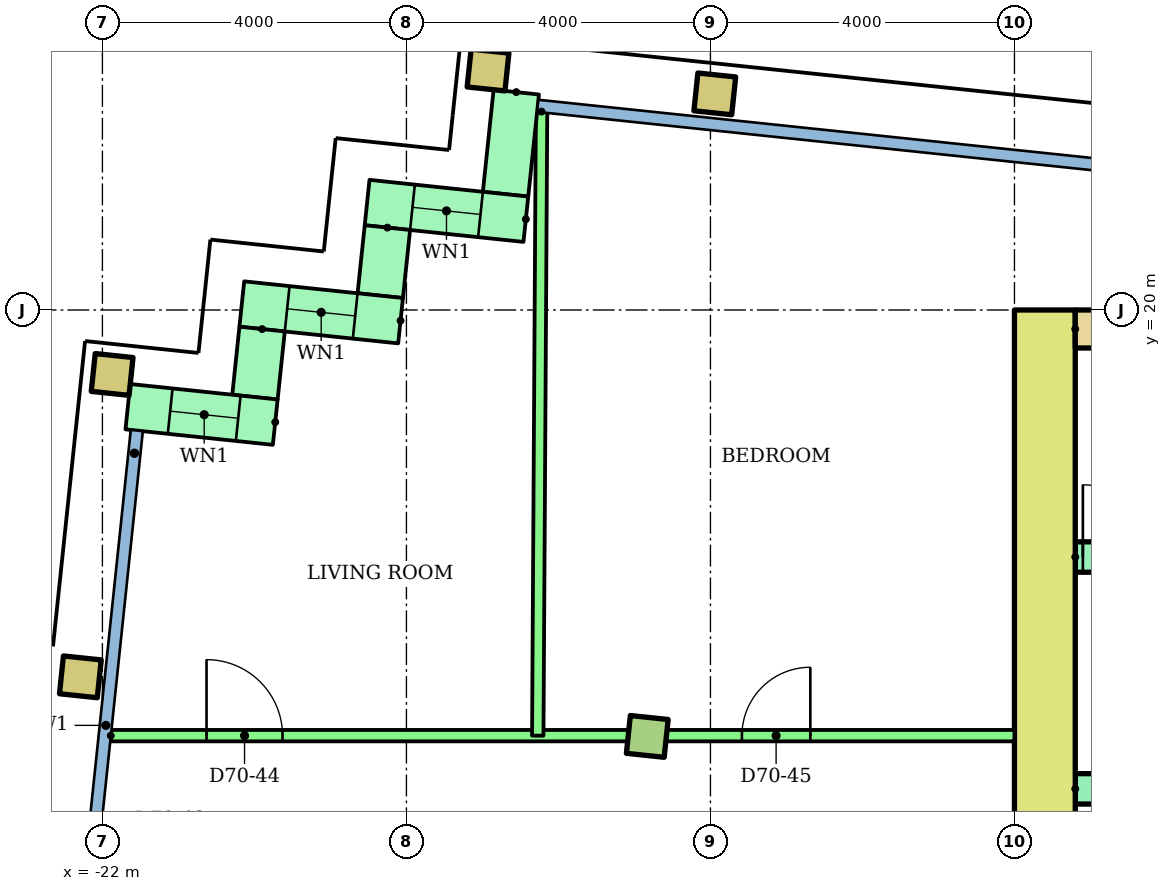
"""IFC4 building model, lengths in metres.
Left out: names, types, materials, properties, quantities, classifications, styles, units other than length and angle.
Written with IfcOpenShell. Run it as: python <this file> out.ifc"""

import sys

from ifc_helpers import new_model, si_unit, direction, frame, frame_2d, origin, origin_2d, place, context, subcontext, project, spatial, rectangle, hollow_rectangle, extrude, element, fill, save


model = new_model("IFC4")
c1 = context("Model", 3, precision=1e-05, world=origin(), true_north=direction((0.0, 1.0)))
c2 = subcontext(c1, "Body", "Model", "MODEL_VIEW")
j1 = project(units=[si_unit("LENGTHUNIT", "METRE"), si_unit("PLANEANGLEUNIT", "RADIAN")], contexts=[c1])
p1 = place(None, origin())
s1 = spatial("IfcSite", under=j1, at=p1, CompositionType="ELEMENT")
p2 = place(p1, origin())
s2 = spatial("IfcBuilding", under=s1, at=p2, CompositionType="ELEMENT")
p3 = place(p2, frame((0.0, 0.0, 269.1)))
s3 = spatial("IfcBuildingStorey", under=s2, at=p3, CompositionType="ELEMENT", Elevation=269.1)
p4 = place(p3, frame((-22.29, 15.174, 0.0), z_axis=(0.0, 0.0, 1.0), x_axis=(0.994521895368, -0.104528463268, 0.0)))
e1 = element("IfcColumn", 1, at=p4, inside=s3, PredefinedType="COLUMN", context=c2, shape_type="SweptSolid", body=[
    extrude(hollow_rectangle(XDim=0.5, YDim=0.5, WallThickness=0.025, at=origin_2d()), origin(), (0.0, 0.0, 1.0), 3.2),
])
p5 = place(p3, frame((-14.831, 14.39, 0.0), z_axis=(0.0, 0.0, 1.0), x_axis=(0.994521895368, -0.104528463268, 0.0)))
e2 = element("IfcColumn", 2, at=p5, inside=s3, PredefinedType="COLUMN", context=c2, shape_type="SweptSolid", body=[
    extrude(rectangle(XDim=0.5, YDim=0.5, at=origin_2d()), origin(), (0.0, 0.0, 1.0), 3.2),
])
for number, where, z_axis, x_axis in (
    (3, (-21.872, 19.152, 0.0), (0.0, 0.0, 1.0), (0.995, -0.105, 0.0)),
    (4, (-16.926, 23.157, 0.0), (0.0, 0.0, 1.0), (0.995, -0.105, 0.0)),
    (5, (-13.943, 22.843, 0.0), (0.0, 0.0, 1.0), (0.995, -0.105, 0.0)),
):
    element("IfcColumn", number, at=place(p3, frame(where, z_axis=z_axis, x_axis=x_axis)), inside=s3, PredefinedType="COLUMN", context=c2, shape_type="SweptSolid", body=[
        extrude(hollow_rectangle(XDim=0.5, YDim=0.5, WallThickness=0.025, at=origin_2d()), origin(), (0.0, 0.0, 1.0), 3.2),
    ])
p6 = place(p3, frame((-16.555, 22.866, 0.0), z_axis=(0.0, 0.0, 1.0), x_axis=(-0.104515354875, -0.994523273029, 0.0)))
e6 = element("IfcWall", 6, at=p6, inside=s3, PredefinedType="STANDARD", context=c2, shape_type="SweptSolid", body=[
    extrude(rectangle(XDim=1.35, YDim=0.6, at=frame_2d((0.675, 0.0))), origin(), (0.0, 0.0, 1.0), 2.92),
])
p7 = place(p3, frame((-16.429, 21.194, 0.0), z_axis=(0.0, 0.0, 1.0), x_axis=(-0.994522640205, 0.104521376379, 0.0)))
e7 = element("IfcWall", 7, at=p7, inside=s3, PredefinedType="STANDARD", context=c2, shape_type="SweptSolid", body=[
    extrude(rectangle(XDim=2.1, YDim=0.6, at=frame_2d((1.05, 0.0))), origin(), (0.0, 0.0, 1.0), 2.92),
])
p8 = place(p7, frame((0.6, 0.0, 0.9)))
e8 = element("IfcOpeningElement", 8, at=p8, cuts=e7, PredefinedType="OPENING", context=c2, shape_type="SweptSolid", body=[
    extrude(rectangle(XDim=0.9, YDim=1.5, at=frame_2d((0.45, 0.75))), frame((0.0, 0.31, 0.0), z_axis=(0.0, -1.0, 0.0), x_axis=(1.0, 0.0, 0.0)), (0.0, 0.0, 1.0), 0.62),
])
p9 = place(p3, frame((-18.25, 21.084, 0.0), z_axis=(0.0, 0.0, 1.0), x_axis=(-0.104416541099, -0.994533652495, 0.0)))
e9 = element("IfcWall", 9, at=p9, inside=s3, PredefinedType="STANDARD", context=c2, shape_type="SweptSolid", body=[
    extrude(rectangle(XDim=0.9, YDim=0.6, at=frame_2d((0.45, 0.0))), origin(), (0.0, 0.0, 1.0), 2.92),
])
p10 = place(p3, frame((-18.077, 19.859, 0.0), z_axis=(0.0, 0.0, 1.0), x_axis=(-0.994522640205, 0.104521376379, 0.0)))
e10 = element("IfcWall", 10, at=p10, inside=s3, PredefinedType="STANDARD", context=c2, shape_type="SweptSolid", body=[
    extrude(rectangle(XDim=2.1, YDim=0.6, at=frame_2d((1.05, 0.0))), origin(), (0.0, 0.0, 1.0), 2.92),
])
p11 = place(p10, frame((0.6, 0.0, 0.9)))
e11 = element("IfcOpeningElement", 11, at=p11, cuts=e10, PredefinedType="OPENING", context=c2, shape_type="SweptSolid", body=[
    extrude(rectangle(XDim=0.9, YDim=1.5, at=frame_2d((0.45, 0.75))), frame((0.0, 0.31, 0.0), z_axis=(0.0, -1.0, 0.0), x_axis=(1.0, 0.0, 0.0)), (0.0, 0.0, 1.0), 0.62),
])
p12 = place(p3, frame((-19.899, 19.749, 0.0), z_axis=(0.0, 0.0, 1.0), x_axis=(-0.104741284723, -0.994499503909, 0.0)))
e12 = element("IfcWall", 12, at=p12, inside=s3, PredefinedType="STANDARD", context=c2, shape_type="SweptSolid", body=[
    extrude(rectangle(XDim=0.9, YDim=0.6, at=frame_2d((0.45, 0.0))), origin(), (0.0, 0.0, 1.0), 2.92),
])
p13 = place(p3, frame((-19.726, 18.524, 0.0), z_axis=(0.0, 0.0, 1.0), x_axis=(-0.994534226826, 0.104411070641, 0.0)))
e13 = element("IfcWall", 13, at=p13, inside=s3, PredefinedType="STANDARD", context=c2, shape_type="SweptSolid", body=[
    extrude(rectangle(XDim=1.95, YDim=0.6, at=frame_2d((0.975, 0.0))), origin(), (0.0, 0.0, 1.0), 2.92),
])
p14 = place(p13, frame((0.49, 0.0, 0.9)))
e14 = element("IfcOpeningElement", 14, at=p14, cuts=e13, PredefinedType="OPENING", context=c2, shape_type="SweptSolid", body=[
    extrude(rectangle(XDim=0.9, YDim=1.5, at=frame_2d((0.45, 0.75))), frame((0.0, 0.31, 0.0), z_axis=(0.0, -1.0, 0.0), x_axis=(1.0, 0.0, 0.0)), (0.0, 0.0, 1.0), 0.62),
])
p15 = place(p3, frame((-9.6, 6.4, 0.0), z_axis=(0.0, 0.0, 1.0), x_axis=(0.0, 1.0, 0.0)))
e15 = element("IfcWall", 15, at=p15, inside=s3, PredefinedType="SHEAR", context=c2, shape_type="SweptSolid", body=[
    extrude(rectangle(XDim=13.6, YDim=0.8, at=frame_2d((6.8, 0.0))), origin(), (0.0, 0.0, 1.0), 2.92),
])
p16 = place(p3, frame((-9.2, 19.75, 0.0)))
e16 = element("IfcWall", 16, at=p16, inside=s3, PredefinedType="SHEAR", context=c2, shape_type="SweptSolid", body=[
    extrude(rectangle(XDim=18.4, YDim=0.5, at=frame_2d((9.2, 0.0))), origin(), (0.0, 0.0, 1.0), 2.92),
])
p17 = place(p3, frame((-9.2, 13.7, 0.0)))
e17 = element("IfcWall", 17, at=p17, inside=s3, PredefinedType="SHEAR", context=c2, shape_type="SweptSolid", body=[
    extrude(rectangle(XDim=8.0, YDim=0.4, at=frame_2d((4.0, 0.0))), origin(), (0.0, 0.0, 1.0), 2.92),
])
p18 = place(p3, frame((-9.2, 16.75, 0.0)))
e18 = element("IfcWall", 18, at=p18, inside=s3, PredefinedType="SHEAR", context=c2, shape_type="SweptSolid", body=[
    extrude(rectangle(XDim=18.4, YDim=0.4, at=frame_2d((9.2, 0.0))), origin(), (0.0, 0.0, 1.0), 2.92),
])
p19 = place(p18, frame((0.1, 0.0, 0.0)))
e19 = element("IfcOpeningElement", 19, at=p19, cuts=e18, PredefinedType="OPENING", context=c2, shape_type="SweptSolid", body=[
    extrude(rectangle(XDim=0.95, YDim=2.1, at=frame_2d((0.475, 1.05))), frame((0.0, 0.21, 0.0), z_axis=(0.0, -1.0, 0.0), x_axis=(1.0, 0.0, 0.0)), (0.0, 0.0, 1.0), 0.42),
])
p20 = place(p18, frame((6.1, 0.0, 0.0)))
e20 = element("IfcOpeningElement", 20, at=p20, cuts=e18, PredefinedType="OPENING", context=c2, shape_type="SweptSolid", body=[
    extrude(rectangle(XDim=0.95, YDim=2.1, at=frame_2d((0.475, 1.05))), frame((0.0, 0.21, 0.0), z_axis=(0.0, -1.0, 0.0), x_axis=(1.0, 0.0, 0.0)), (0.0, 0.0, 1.0), 0.42),
])
p21 = place(p18, frame((12.1, 0.0, 0.0)))
e21 = element("IfcOpeningElement", 21, at=p21, cuts=e18, PredefinedType="OPENING", context=c2, shape_type="SweptSolid", body=[
    extrude(rectangle(XDim=0.95, YDim=2.1, at=frame_2d((0.475, 1.05))), frame((0.0, 0.21, 0.0), z_axis=(0.0, -1.0, 0.0), x_axis=(1.0, 0.0, 0.0)), (0.0, 0.0, 1.0), 0.42),
])
p22 = place(p3, frame((-21.89, 14.4, 0.0)))
e22 = element("IfcWall", 22, at=p22, inside=s3, PredefinedType="PARTITIONING", context=c2, shape_type="SweptSolid", body=[
    extrude(rectangle(XDim=11.89, YDim=0.15, at=frame_2d((5.945, 0.0))), origin(), (0.0, 0.0, 1.0), 2.4),
])
p23 = place(p22, frame((1.26, 0.0, 0.0)))
e23 = element("IfcOpeningElement", 23, at=p23, cuts=e22, PredefinedType="OPENING", context=c2, shape_type="SweptSolid", body=[
    extrude(rectangle(XDim=1.0, YDim=2.1, at=frame_2d((0.5, 1.05))), frame((0.0, 0.085, 0.0), z_axis=(0.0, -1.0, 0.0), x_axis=(1.0, 0.0, 0.0)), (0.0, 0.0, 1.0), 0.17),
])
p24 = place(p22, frame((8.304, 0.0, 0.0)))
e24 = element("IfcOpeningElement", 24, at=p24, cuts=e22, PredefinedType="OPENING", context=c2, shape_type="SweptSolid", body=[
    extrude(rectangle(XDim=0.9, YDim=2.1, at=frame_2d((0.45, 1.05))), frame((0.0, 0.085, 0.0), z_axis=(0.0, -1.0, 0.0), x_axis=(1.0, 0.0, 0.0)), (0.0, 0.0, 1.0), 0.17),
])
p25 = place(p3, frame((-16.222, 22.61, 0.0), z_axis=(0.0, 0.0, 1.0), x_axis=(-0.006095634594, -0.999981421447, 0.0)))
e25 = element("IfcWall", 25, at=p25, inside=s3, PredefinedType="PARTITIONING", context=c2, shape_type="SweptSolid", body=[
    extrude(rectangle(XDim=8.211, YDim=0.15, at=frame_2d((4.105, 0.0))), origin(), (0.0, 0.0, 1.0), 2.4),
])
p26 = place(p8, origin())
e26 = element("IfcWindow", 26, at=p26, inside=s3, PartitioningType="SINGLE_PANEL", PredefinedType="WINDOW", context=c2, shape_type="SweptSolid", body=[
    extrude(rectangle(XDim=0.9, YDim=1.5, at=frame_2d((0.45, 0.75))), frame((0.0, 0.03, 0.0), z_axis=(0.0, -1.0, 0.0), x_axis=(1.0, 0.0, 0.0)), (0.0, 0.0, 1.0), 0.06),
])
fill(e8, e26)
p27 = place(p11, origin())
e27 = element("IfcWindow", 27, at=p27, inside=s3, PartitioningType="SINGLE_PANEL", PredefinedType="WINDOW", context=c2, shape_type="SweptSolid", body=[
    extrude(rectangle(XDim=0.9, YDim=1.5, at=frame_2d((0.45, 0.75))), frame((0.0, 0.03, 0.0), z_axis=(0.0, -1.0, 0.0), x_axis=(1.0, 0.0, 0.0)), (0.0, 0.0, 1.0), 0.06),
])
fill(e11, e27)
p28 = place(p14, origin())
e28 = element("IfcWindow", 28, at=p28, inside=s3, PartitioningType="SINGLE_PANEL", PredefinedType="WINDOW", context=c2, shape_type="SweptSolid", body=[
    extrude(rectangle(XDim=0.9, YDim=1.5, at=frame_2d((0.45, 0.75))), frame((0.0, 0.03, 0.0), z_axis=(0.0, -1.0, 0.0), x_axis=(1.0, 0.0, 0.0)), (0.0, 0.0, 1.0), 0.06),
])
fill(e14, e28)
p29 = place(p19, origin())
e29 = element("IfcDoor", 29, at=p29, inside=s3, OperationType="SINGLE_SWING_LEFT", PredefinedType="DOOR", context=c2, shape_type="SweptSolid", body=[
    extrude(rectangle(XDim=0.95, YDim=2.1, at=frame_2d((0.475, 1.05))), frame((0.0, 0.025, 0.0), z_axis=(0.0, -1.0, 0.0), x_axis=(1.0, 0.0, 0.0)), (0.0, 0.0, 1.0), 0.05),
])
fill(e19, e29)
p30 = place(p23, origin())
e30 = element("IfcDoor", 30, at=p30, inside=s3, OperationType="SINGLE_SWING_LEFT", PredefinedType="DOOR", context=c2, shape_type="SweptSolid", body=[
    extrude(rectangle(XDim=1.0, YDim=2.1, at=frame_2d((0.5, 1.05))), frame((0.0, 0.025, 0.0), z_axis=(0.0, -1.0, 0.0), x_axis=(1.0, 0.0, 0.0)), (0.0, 0.0, 1.0), 0.05),
])
fill(e23, e30)
p31 = place(p24, origin())
e31 = element("IfcDoor", 31, at=p31, inside=s3, OperationType="SINGLE_SWING_RIGHT", PredefinedType="DOOR", context=c2, shape_type="SweptSolid", body=[
    extrude(rectangle(XDim=0.9, YDim=2.1, at=frame_2d((0.45, 1.05))), frame((0.0, 0.025, 0.0), z_axis=(0.0, -1.0, 0.0), x_axis=(1.0, 0.0, 0.0)), (0.0, 0.0, 1.0), 0.05),
])
fill(e24, e31)
save(model, sys.argv[1])
